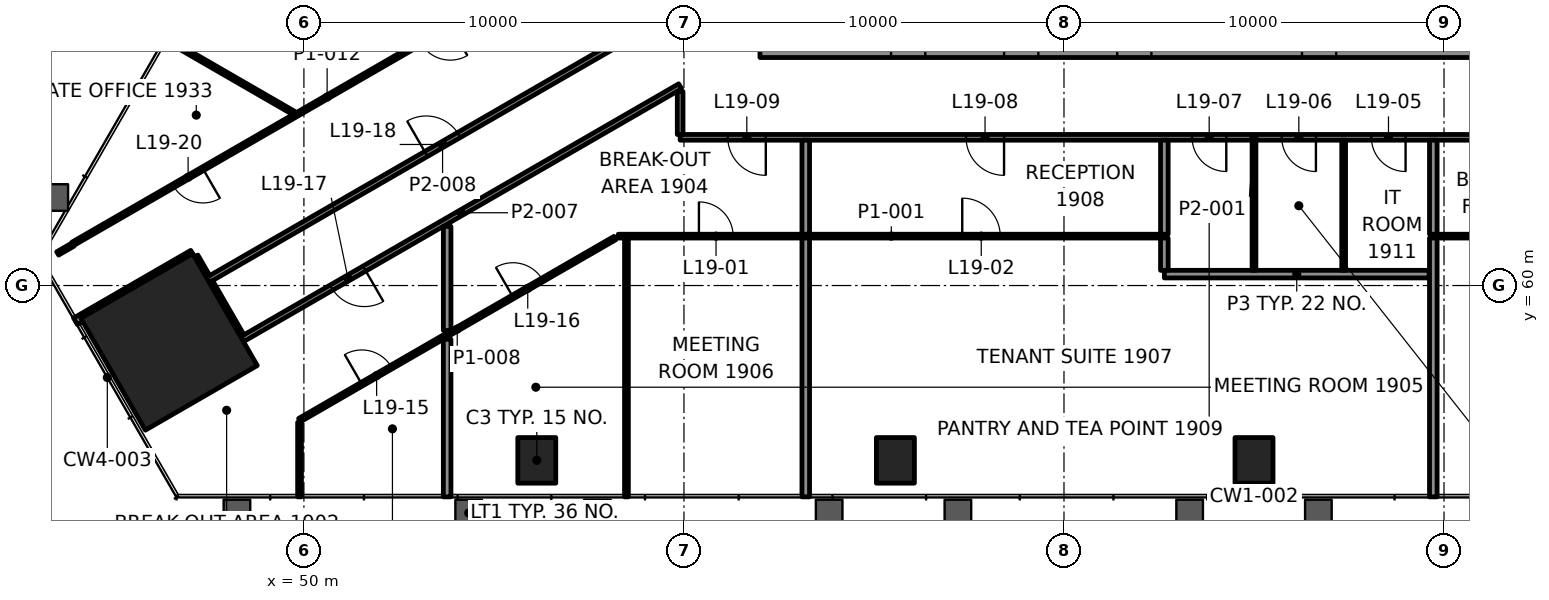
"""IFC4 building model, lengths in metres.
Left out: names, types, materials, properties, quantities, classifications, styles, units other than length and angle.
Written with IfcOpenShell. Run it as: python <this file> out.ifc"""

import sys

from ifc_helpers import new_model, si_unit, direction, frame, frame_2d, origin, origin_2d, place, context, subcontext, project, spatial, rectangle, extrude, element, fill, save


model = new_model("IFC4")
c1 = context("Model", 3, precision=1e-05, world=origin(), true_north=direction((0.0, 1.0)))
c2 = subcontext(c1, "Body", "Model", "MODEL_VIEW")
j1 = project(units=[si_unit("LENGTHUNIT", "METRE"), si_unit("PLANEANGLEUNIT", "RADIAN")], contexts=[c1])
p1 = place(None, origin())
s1 = spatial("IfcSite", under=j1, at=p1, CompositionType="ELEMENT")
p2 = place(p1, origin())
s2 = spatial("IfcBuilding", under=s1, at=p2, CompositionType="ELEMENT")
p3 = place(p2, frame((0.0, 0.0, 86.2)))
s3 = spatial("IfcBuildingStorey", under=s2, at=p3, CompositionType="ELEMENT", Elevation=86.2)
p4 = place(p3, frame((46.45, 58.517, 0.0), z_axis=(0.0, 0.0, 1.0), x_axis=(0.5, -0.866025403784, 0.0)))
e1 = element("IfcColumn", 1, at=p4, inside=s3, PredefinedType="COLUMN", context=c2, shape_type="SweptSolid", body=[
    extrude(rectangle(XDim=3.4, YDim=3.4, at=origin_2d()), origin(), (0.0, 0.0, 1.0), 4.2),
])
for number, where, z_axis, x_axis in (
    (2, (56.128, 55.399, -0.0), (0.0, 0.0, 1.0), (1.0, 0.0, 0.0)),
    (3, (65.564, 55.399, -0.0), (0.0, 0.0, 1.0), (1.0, 0.0, 0.0)),
    (4, (75.0, 55.399, -0.0), (0.0, 0.0, 1.0), (1.0, 0.0, 0.0)),
):
    element("IfcColumn", number, at=place(p3, frame(where, z_axis=z_axis, x_axis=x_axis)), inside=s3, PredefinedType="COLUMN", context=c2, shape_type="SweptSolid", body=[
        extrude(rectangle(XDim=1.0, YDim=1.2, at=origin_2d()), origin(), (0.0, 0.0, 1.0), 4.2),
    ])
p5 = place(p3, frame((62.0, 66.45, 0.0), z_axis=(0.0, 0.0, 1.0), x_axis=(1.0, 0.0, 0.0)))
e5 = element("IfcWall", 5, at=p5, inside=s3, PredefinedType="SHEAR", context=c2, shape_type="SweptSolid", body=[
    extrude(rectangle(XDim=26.0, YDim=0.9, at=frame_2d((13.0, 0.0))), origin(), (0.0, 0.0, 1.0), 4.0),
])
p6 = place(p5, frame((3.45, 0.0, 0.0)))
e6 = element("IfcOpeningElement", 6, at=p6, cuts=e5, PredefinedType="OPENING", context=c2, shape_type="SweptSolid", body=[
    extrude(rectangle(XDim=0.9, YDim=2.1, at=frame_2d((0.45, 1.05))), frame((0.0, 0.46, 0.0), z_axis=(0.0, -1.0, 0.0), x_axis=(1.0, 0.0, 0.0)), (0.0, 0.0, 1.0), 0.92),
])
p7 = place(p5, frame((6.425, 0.0, 0.0)))
e7 = element("IfcOpeningElement", 7, at=p7, cuts=e5, PredefinedType="OPENING", context=c2, shape_type="SweptSolid", body=[
    extrude(rectangle(XDim=0.9, YDim=2.1, at=frame_2d((0.45, 1.05))), frame((0.0, 0.46, 0.0), z_axis=(0.0, -1.0, 0.0), x_axis=(1.0, 0.0, 0.0)), (0.0, 0.0, 1.0), 0.92),
])
p8 = place(p5, frame((9.4, 0.0, 0.0)))
e8 = element("IfcOpeningElement", 8, at=p8, cuts=e5, PredefinedType="OPENING", context=c2, shape_type="SweptSolid", body=[
    extrude(rectangle(XDim=0.9, YDim=2.1, at=frame_2d((0.45, 1.05))), frame((0.0, 0.46, 0.0), z_axis=(0.0, -1.0, 0.0), x_axis=(1.0, 0.0, 0.0)), (0.0, 0.0, 1.0), 0.92),
])
p9 = place(p5, frame((14.262, 0.0, 0.0)))
e9 = element("IfcOpeningElement", 9, at=p9, cuts=e5, PredefinedType="OPENING", context=c2, shape_type="SweptSolid", body=[
    extrude(rectangle(XDim=0.9, YDim=2.1, at=frame_2d((0.45, 1.05))), frame((0.0, 0.46, 0.0), z_axis=(0.0, -1.0, 0.0), x_axis=(1.0, 0.0, 0.0)), (0.0, 0.0, 1.0), 0.92),
])
p10 = place(p5, frame((21.188, 0.0, 0.0)))
e10 = element("IfcOpeningElement", 10, at=p10, cuts=e5, PredefinedType="OPENING", context=c2, shape_type="SweptSolid", body=[
    extrude(rectangle(XDim=0.9, YDim=2.1, at=frame_2d((0.45, 1.05))), frame((0.0, 0.46, 0.0), z_axis=(0.0, -1.0, 0.0), x_axis=(1.0, 0.0, 0.0)), (0.0, 0.0, 1.0), 0.92),
])
p11 = place(p3, frame((72.641, 60.3, 0.0), z_axis=(0.0, 0.0, 1.0), x_axis=(1.0, 0.0, 0.0)))
e11 = element("IfcWall", 11, at=p11, inside=s3, PredefinedType="PARTITIONING", context=c2, shape_type="SweptSolid", body=[
    extrude(rectangle(XDim=6.967, YDim=0.2, at=frame_2d((3.484, 0.0))), origin(), (0.0, 0.0, 1.0), 3.4),
])
p12 = place(p3, frame((58.271, 61.3, 0.0), z_axis=(0.0, 0.0, 1.0), x_axis=(1.0, 0.0, 0.0)))
e12 = element("IfcWall", 12, at=p12, inside=s3, PredefinedType="PARTITIONING", context=c2, shape_type="SweptSolid", body=[
    extrude(rectangle(XDim=14.37, YDim=0.1, at=frame_2d((7.185, 0.0))), origin(), (0.0, 0.0, 1.0), 3.4),
])
p13 = place(p12, frame((2.123, 0.0, 0.0)))
e13 = element("IfcOpeningElement", 13, at=p13, cuts=e12, PredefinedType="OPENING", context=c2, shape_type="SweptSolid", body=[
    extrude(rectangle(XDim=0.9, YDim=2.1, at=frame_2d((0.45, 1.05))), frame((0.0, 0.06, 0.0), z_axis=(0.0, -1.0, 0.0), x_axis=(1.0, 0.0, 0.0)), (0.0, 0.0, 1.0), 0.12),
])
p14 = place(p12, frame((9.052, 0.0, 0.0)))
e14 = element("IfcOpeningElement", 14, at=p14, cuts=e12, PredefinedType="OPENING", context=c2, shape_type="SweptSolid", body=[
    extrude(rectangle(XDim=1.0, YDim=2.1, at=frame_2d((0.5, 1.05))), frame((0.0, 0.06, 0.0), z_axis=(0.0, -1.0, 0.0), x_axis=(1.0, 0.0, 0.0)), (0.0, 0.0, 1.0), 0.12),
])
p15 = place(p3, frame((79.718, 61.3, 0.0), z_axis=(0.0, 0.0, 1.0), x_axis=(1.0, 0.0, 0.0)))
e15 = element("IfcWall", 15, at=p15, inside=s3, PredefinedType="PARTITIONING", context=c2, shape_type="SweptSolid", body=[
    extrude(rectangle(XDim=11.911, YDim=0.1, at=frame_2d((5.956, 0.0))), origin(), (0.0, 0.0, 1.0), 3.4),
])
p16 = place(p15, frame((5.355, 0.0, 0.0)))
e16 = element("IfcOpeningElement", 16, at=p16, cuts=e15, PredefinedType="OPENING", context=c2, shape_type="SweptSolid", body=[
    extrude(rectangle(XDim=1.2, YDim=2.1, at=frame_2d((0.6, 1.05))), frame((0.0, 0.06, 0.0), z_axis=(0.0, -1.0, 0.0), x_axis=(1.0, 0.0, 0.0)), (0.0, 0.0, 1.0), 0.12),
])
p17 = place(p3, frame((90.1, 63.9, 0.0), z_axis=(0.0, 0.0, 1.0), x_axis=(-1.0, 0.0, 0.0)))
e17 = element("IfcWall", 17, at=p17, inside=s3, PredefinedType="PARTITIONING", context=c2, shape_type="SweptSolid", body=[
    extrude(rectangle(XDim=30.2, YDim=0.15, at=frame_2d((15.1, 0.0))), origin(), (0.0, 0.0, 1.0), 3.4),
])
p18 = place(p17, frame((4.792, 0.0, 0.0)))
e18 = element("IfcOpeningElement", 18, at=p18, cuts=e17, PredefinedType="OPENING", context=c2, shape_type="SweptSolid", body=[
    extrude(rectangle(XDim=1.0, YDim=2.1, at=frame_2d((0.5, 1.05))), frame((0.0, 0.085, 0.0), z_axis=(0.0, -1.0, 0.0), x_axis=(1.0, 0.0, 0.0)), (0.0, 0.0, 1.0), 0.17),
])
p19 = place(p17, frame((11.111, 0.0, 0.0)))
e19 = element("IfcOpeningElement", 19, at=p19, cuts=e17, PredefinedType="OPENING", context=c2, shape_type="SweptSolid", body=[
    extrude(rectangle(XDim=0.9, YDim=2.1, at=frame_2d((0.45, 1.05))), frame((0.0, 0.085, 0.0), z_axis=(0.0, -1.0, 0.0), x_axis=(1.0, 0.0, 0.0)), (0.0, 0.0, 1.0), 0.17),
])
p20 = place(p17, frame((13.47, 0.0, 0.0)))
e20 = element("IfcOpeningElement", 20, at=p20, cuts=e17, PredefinedType="OPENING", context=c2, shape_type="SweptSolid", body=[
    extrude(rectangle(XDim=0.9, YDim=2.1, at=frame_2d((0.45, 1.05))), frame((0.0, 0.085, 0.0), z_axis=(0.0, -1.0, 0.0), x_axis=(1.0, 0.0, 0.0)), (0.0, 0.0, 1.0), 0.17),
])
p21 = place(p17, frame((15.83, 0.0, 0.0)))
e21 = element("IfcOpeningElement", 21, at=p21, cuts=e17, PredefinedType="OPENING", context=c2, shape_type="SweptSolid", body=[
    extrude(rectangle(XDim=0.9, YDim=2.1, at=frame_2d((0.45, 1.05))), frame((0.0, 0.085, 0.0), z_axis=(0.0, -1.0, 0.0), x_axis=(1.0, 0.0, 0.0)), (0.0, 0.0, 1.0), 0.17),
])
p22 = place(p17, frame((21.677, 0.0, 0.0)))
e22 = element("IfcOpeningElement", 22, at=p22, cuts=e17, PredefinedType="OPENING", context=c2, shape_type="SweptSolid", body=[
    extrude(rectangle(XDim=1.0, YDim=2.1, at=frame_2d((0.5, 1.05))), frame((0.0, 0.085, 0.0), z_axis=(0.0, -1.0, 0.0), x_axis=(1.0, 0.0, 0.0)), (0.0, 0.0, 1.0), 0.17),
])
p23 = place(p17, frame((27.946, 0.0, 0.0)))
e23 = element("IfcOpeningElement", 23, at=p23, cuts=e17, PredefinedType="OPENING", context=c2, shape_type="SweptSolid", body=[
    extrude(rectangle(XDim=1.0, YDim=2.1, at=frame_2d((0.5, 1.05))), frame((0.0, 0.085, 0.0), z_axis=(0.0, -1.0, 0.0), x_axis=(1.0, 0.0, 0.0)), (0.0, 0.0, 1.0), 0.17),
])
p24 = place(p3, frame((49.885, 56.458, 0.0), z_axis=(0.0, 0.0, 1.0), x_axis=(0.866030313286, 0.499991496398, 0.0)))
e24 = element("IfcWall", 24, at=p24, inside=s3, PredefinedType="PARTITIONING", context=c2, shape_type="SweptSolid", body=[
    extrude(rectangle(XDim=9.583, YDim=0.1, at=frame_2d((4.792, 0.0))), origin(), (0.0, 0.0, 1.0), 3.4),
])
p25 = place(p24, frame((1.892, 0.0, 0.0)))
e25 = element("IfcOpeningElement", 25, at=p25, cuts=e24, PredefinedType="OPENING", context=c2, shape_type="SweptSolid", body=[
    extrude(rectangle(XDim=0.9, YDim=2.1, at=frame_2d((0.45, 1.05))), frame((0.0, 0.06, 0.0), z_axis=(0.0, -1.0, 0.0), x_axis=(1.0, 0.0, 0.0)), (0.0, 0.0, 1.0), 0.12),
])
p26 = place(p24, frame((6.484, 0.0, 0.0)))
e26 = element("IfcOpeningElement", 26, at=p26, cuts=e24, PredefinedType="OPENING", context=c2, shape_type="SweptSolid", body=[
    extrude(rectangle(XDim=0.9, YDim=2.1, at=frame_2d((0.45, 1.05))), frame((0.0, 0.06, 0.0), z_axis=(0.0, -1.0, 0.0), x_axis=(1.0, 0.0, 0.0)), (0.0, 0.0, 1.0), 0.12),
])
p27 = place(p3, frame((59.9, 65.243, 0.0), z_axis=(0.0, 0.0, 1.0), x_axis=(-0.866025527764, -0.499999785261, 0.0)))
e27 = element("IfcWall", 27, at=p27, inside=s3, PredefinedType="PARTITIONING", context=c2, shape_type="SweptSolid", body=[
    extrude(rectangle(XDim=13.31, YDim=0.15, at=frame_2d((6.655, 0.0))), origin(), (0.0, 0.0, 1.0), 3.247),
])
p28 = place(p27, frame((9.594, 0.0, 0.0)))
e28 = element("IfcOpeningElement", 28, at=p28, cuts=e27, PredefinedType="OPENING", context=c2, shape_type="SweptSolid", body=[
    extrude(rectangle(XDim=1.0, YDim=2.1, at=frame_2d((0.5, 1.05))), frame((0.0, 0.085, 0.0), z_axis=(0.0, -1.0, 0.0), x_axis=(1.0, 0.0, 0.0)), (0.0, 0.0, 1.0), 0.17),
])
p29 = place(p3, frame((47.473, 60.146, 0.0), z_axis=(0.0, 0.0, 1.0), x_axis=(0.866025677055, 0.499999526681, 0.0)))
e29 = element("IfcWall", 29, at=p29, inside=s3, PredefinedType="PARTITIONING", context=c2, shape_type="SweptSolid", body=[
    extrude(rectangle(XDim=14.263, YDim=0.15, at=frame_2d((7.132, 0.0))), origin(), (0.0, 0.0, 1.0), 3.4),
])
p30 = place(p29, frame((6.632, 0.0, 0.0)))
e30 = element("IfcOpeningElement", 30, at=p30, cuts=e29, PredefinedType="OPENING", context=c2, shape_type="SweptSolid", body=[
    extrude(rectangle(XDim=1.0, YDim=2.1, at=frame_2d((0.5, 1.05))), frame((0.0, 0.085, 0.0), z_axis=(0.0, -1.0, 0.0), x_axis=(1.0, 0.0, 0.0)), (0.0, 0.0, 1.0), 0.17),
])
p31 = place(p3, frame((43.99, 59.058, 0.0), z_axis=(0.0, 0.0, 1.0), x_axis=(0.866031398331, 0.499989616998, 0.0)))
e31 = element("IfcWall", 31, at=p31, inside=s3, PredefinedType="PARTITIONING", context=c2, shape_type="SweptSolid", body=[
    extrude(rectangle(XDim=3.56, YDim=0.2, at=frame_2d((1.78, 0.0))), origin(), (0.0, 0.0, 1.0), 3.4),
])
p32 = place(p3, frame((43.521, 60.845, 0.0), z_axis=(0.0, 0.0, 1.0), x_axis=(0.865979310119, 0.500079828073, 0.0)))
e32 = element("IfcWall", 32, at=p32, inside=s3, PredefinedType="PARTITIONING", context=c2, shape_type="SweptSolid", body=[
    extrude(rectangle(XDim=0.473, YDim=0.1, at=frame_2d((0.237, 0.0))), origin(), (0.0, 0.0, 1.0), 3.4),
])
p33 = place(p3, frame((57.3, 68.823, 0.0), z_axis=(0.0, 0.0, 1.0), x_axis=(-0.866026891502, -0.499997423189, 0.0)))
e33 = element("IfcWall", 33, at=p33, inside=s3, PredefinedType="PARTITIONING", context=c2, shape_type="SweptSolid", body=[
    extrude(rectangle(XDim=15.448, YDim=0.1, at=frame_2d((7.724, 0.0))), origin(), (0.0, 0.0, 1.0), 3.4),
])
p34 = place(p33, frame((3.982, 0.0, 0.0)))
e34 = element("IfcOpeningElement", 34, at=p34, cuts=e33, PredefinedType="OPENING", context=c2, shape_type="SweptSolid", body=[
    extrude(rectangle(XDim=0.9, YDim=2.1, at=frame_2d((0.45, 1.05))), frame((0.0, 0.06, 0.0), z_axis=(0.0, -1.0, 0.0), x_axis=(1.0, 0.0, 0.0)), (0.0, 0.0, 1.0), 0.12),
])
p35 = place(p33, frame((11.498, 0.0, 0.0)))
e35 = element("IfcOpeningElement", 35, at=p35, cuts=e33, PredefinedType="OPENING", context=c2, shape_type="SweptSolid", body=[
    extrude(rectangle(XDim=0.9, YDim=2.1, at=frame_2d((0.45, 1.05))), frame((0.0, 0.06, 0.0), z_axis=(0.0, -1.0, 0.0), x_axis=(1.0, 0.0, 0.0)), (0.0, 0.0, 1.0), 0.12),
])
p36 = place(p3, frame((79.718, 54.439, 0.0), z_axis=(0.0, 0.0, 1.0), x_axis=(0.0, 1.0, 0.0)))
e36 = element("IfcWall", 36, at=p36, inside=s3, PredefinedType="PARTITIONING", context=c2, shape_type="SweptSolid", body=[
    extrude(rectangle(XDim=6.811, YDim=0.2, at=frame_2d((3.405, 0.0))), origin(), (0.0, 0.0, 1.0), 3.165),
])
for number, where, z_axis, x_axis in (
    (37, (77.359, 60.4, 0.0), (0.0, 0.0, 1.0), (0.0, 1.0, 0.0)),
    (38, (75.0, 60.4, 0.0), (0.0, 0.0, 1.0), (0.0, 1.0, 0.0)),
):
    element("IfcWall", number, at=place(p3, frame(where, z_axis=z_axis, x_axis=x_axis)), inside=s3, PredefinedType="PARTITIONING", context=c2, shape_type="SweptSolid", body=[
        extrude(rectangle(XDim=3.425, YDim=0.1, at=frame_2d((1.712, 0.0))), origin(), (0.0, 0.0, 1.0), 3.4),
    ])
p37 = place(p3, frame((72.641, 60.4, 0.0), z_axis=(0.0, 0.0, 1.0), x_axis=(0.0, 1.0, 0.0)))
e39 = element("IfcWall", 39, at=p37, inside=s3, PredefinedType="PARTITIONING", context=c2, shape_type="SweptSolid", body=[
    extrude(rectangle(XDim=0.85, YDim=0.2, at=frame_2d((0.425, 0.0))), origin(), (0.0, 0.0, 1.0), 3.4),
])
p38 = place(p3, frame((63.205, 54.439, 0.0), z_axis=(0.0, 0.0, 1.0), x_axis=(0.0, 1.0, 0.0)))
e40 = element("IfcWall", 40, at=p38, inside=s3, PredefinedType="PARTITIONING", context=c2, shape_type="SweptSolid", body=[
    extrude(rectangle(XDim=6.811, YDim=0.2, at=frame_2d((3.405, 0.0))), origin(), (0.0, 0.0, 1.0), 3.165),
])
p39 = place(p3, frame((59.9, 63.975, 0.0), z_axis=(0.0, 0.0, 1.0), x_axis=(0.0, 1.0, 0.0)))
e41 = element("IfcWall", 41, at=p39, inside=s3, PredefinedType="PARTITIONING", context=c2, shape_type="SweptSolid", body=[
    extrude(rectangle(XDim=1.131, YDim=0.15, at=frame_2d((0.565, 0.0))), origin(), (0.0, 0.0, 1.0), 3.247),
])
p40 = place(p3, frame((58.487, 54.439, 0.0), z_axis=(0.0, 0.0, 1.0), x_axis=(0.0, 1.0, 0.0)))
e42 = element("IfcWall", 42, at=p40, inside=s3, PredefinedType="PARTITIONING", context=c2, shape_type="SweptSolid", body=[
    extrude(rectangle(XDim=6.811, YDim=0.1, at=frame_2d((3.405, 0.0))), origin(), (0.0, 0.0, 1.0), 3.165),
])
p41 = place(p3, frame((53.769, 54.439, 0.0), z_axis=(0.0, 0.0, 1.0), x_axis=(0.0, 1.0, 0.0)))
e43 = element("IfcWall", 43, at=p41, inside=s3, PredefinedType="PARTITIONING", context=c2, shape_type="SweptSolid", body=[
    extrude(rectangle(XDim=4.146, YDim=0.2, at=frame_2d((2.073, 0.0))), origin(), (0.0, 0.0, 1.0), 3.4),
])
p42 = place(p3, frame((49.885, 54.439, 0.0), z_axis=(0.0, 0.0, 1.0), x_axis=(0.0, 1.0, 0.0)))
e44 = element("IfcWall", 44, at=p42, inside=s3, PredefinedType="PARTITIONING", context=c2, shape_type="SweptSolid", body=[
    extrude(rectangle(XDim=1.961, YDim=0.1, at=frame_2d((0.981, 0.0))), origin(), (0.0, 0.0, 1.0), 3.4),
])
p43 = place(p3, frame((48.335, 58.653, 0.0), z_axis=(0.0, 0.0, 1.0), x_axis=(-0.499991515992, 0.866030301974, 0.0)))
e45 = element("IfcWall", 45, at=p43, inside=s3, PredefinedType="PARTITIONING", context=c2, shape_type="SweptSolid", body=[
    extrude(rectangle(XDim=1.649, YDim=0.2, at=frame_2d((0.825, 0.0))), origin(), (0.0, 0.0, 1.0), 3.247),
])
p44 = place(p3, frame((49.732, 64.541, 0.0), z_axis=(0.0, 0.0, 1.0), x_axis=(-0.866020177134, 0.500009052715, 0.0)))
e46 = element("IfcWall", 46, at=p44, inside=s3, PredefinedType="PARTITIONING", context=c2, shape_type="SweptSolid", body=[
    extrude(rectangle(XDim=3.908, YDim=0.1, at=frame_2d((1.954, 0.0))), origin(), (0.0, 0.0, 1.0), 3.4),
])
for number, where, z_axis, x_axis in (
    (47, (72.641, 61.35, 0.0), (0.0, 0.0, 1.0), (0.0, 1.0, 0.0)),
    (48, (79.718, 61.35, 0.0), (0.0, 0.0, 1.0), (0.0, 1.0, 0.0)),
):
    element("IfcWall", number, at=place(p3, frame(where, z_axis=z_axis, x_axis=x_axis)), inside=s3, PredefinedType="PARTITIONING", context=c2, shape_type="SweptSolid", body=[
        extrude(rectangle(XDim=2.475, YDim=0.2, at=frame_2d((1.237, 0.0))), origin(), (0.0, 0.0, 1.0), 3.4),
    ])
p45 = place(p3, frame((53.769, 58.816, 0.0), z_axis=(0.0, 0.0, 1.0), x_axis=(0.0, 1.0, 0.0)))
e49 = element("IfcWall", 49, at=p45, inside=s3, PredefinedType="PARTITIONING", context=c2, shape_type="SweptSolid", body=[
    extrude(rectangle(XDim=2.74, YDim=0.2, at=frame_2d((1.37, 0.0))), origin(), (0.0, 0.0, 1.0), 3.4),
])
p46 = place(p3, frame((47.435, 60.211, 0.0), z_axis=(0.0, 0.0, 1.0), x_axis=(-0.499801510763, 0.866139971275, 0.0)))
e50 = element("IfcWall", 50, at=p46, inside=s3, PredefinedType="PARTITIONING", context=c2, shape_type="SweptSolid", body=[
    extrude(rectangle(XDim=0.624, YDim=0.2, at=frame_2d((0.312, 0.0))), origin(), (0.0, 0.0, 1.0), 3.4),
])
p47 = place(p3, frame((63.205, 61.35, 0.0), z_axis=(0.0, 0.0, 1.0), x_axis=(0.0, 1.0, 0.0)))
e51 = element("IfcWall", 51, at=p47, inside=s3, PredefinedType="PARTITIONING", context=c2, shape_type="SweptSolid", body=[
    extrude(rectangle(XDim=2.475, YDim=0.2, at=frame_2d((1.237, 0.0))), origin(), (0.0, 0.0, 1.0), 3.4),
])
p48 = place(p13, origin())
e52 = element("IfcDoor", 52, at=p48, inside=s3, OperationType="SINGLE_SWING_LEFT", PredefinedType="DOOR", context=c2, shape_type="SweptSolid", body=[
    extrude(rectangle(XDim=0.9, YDim=2.1, at=frame_2d((0.45, 1.05))), frame((0.0, 0.025, 0.0), z_axis=(0.0, -1.0, 0.0), x_axis=(1.0, 0.0, 0.0)), (0.0, 0.0, 1.0), 0.05),
])
fill(e13, e52)
p49 = place(p14, origin())
e53 = element("IfcDoor", 53, at=p49, inside=s3, OperationType="SINGLE_SWING_RIGHT", PredefinedType="DOOR", context=c2, shape_type="SweptSolid", body=[
    extrude(rectangle(XDim=1.0, YDim=2.1, at=frame_2d((0.5, 1.05))), frame((0.0, 0.025, 0.0), z_axis=(0.0, -1.0, 0.0), x_axis=(1.0, 0.0, 0.0)), (0.0, 0.0, 1.0), 0.05),
])
fill(e14, e53)
p50 = place(p19, origin())
e54 = element("IfcDoor", 54, at=p50, inside=s3, OperationType="SINGLE_SWING_LEFT", PredefinedType="DOOR", context=c2, shape_type="SweptSolid", body=[
    extrude(rectangle(XDim=0.9, YDim=2.1, at=frame_2d((0.45, 1.05))), frame((0.0, 0.025, 0.0), z_axis=(0.0, -1.0, 0.0), x_axis=(1.0, 0.0, 0.0)), (0.0, 0.0, 1.0), 0.05),
])
fill(e19, e54)
p51 = place(p20, origin())
e55 = element("IfcDoor", 55, at=p51, inside=s3, OperationType="SINGLE_SWING_RIGHT", PredefinedType="DOOR", context=c2, shape_type="SweptSolid", body=[
    extrude(rectangle(XDim=0.9, YDim=2.1, at=frame_2d((0.45, 1.05))), frame((0.0, 0.025, 0.0), z_axis=(0.0, -1.0, 0.0), x_axis=(1.0, 0.0, 0.0)), (0.0, 0.0, 1.0), 0.05),
])
fill(e20, e55)
p52 = place(p21, origin())
e56 = element("IfcDoor", 56, at=p52, inside=s3, OperationType="SINGLE_SWING_LEFT", PredefinedType="DOOR", context=c2, shape_type="SweptSolid", body=[
    extrude(rectangle(XDim=0.9, YDim=2.1, at=frame_2d((0.45, 1.05))), frame((0.0, 0.025, 0.0), z_axis=(0.0, -1.0, 0.0), x_axis=(1.0, 0.0, 0.0)), (0.0, 0.0, 1.0), 0.05),
])
fill(e21, e56)
p53 = place(p22, origin())
e57 = element("IfcDoor", 57, at=p53, inside=s3, OperationType="SINGLE_SWING_RIGHT", PredefinedType="DOOR", context=c2, shape_type="SweptSolid", body=[
    extrude(rectangle(XDim=1.0, YDim=2.1, at=frame_2d((0.5, 1.05))), frame((0.0, 0.025, 0.0), z_axis=(0.0, -1.0, 0.0), x_axis=(1.0, 0.0, 0.0)), (0.0, 0.0, 1.0), 0.05),
])
fill(e22, e57)
p54 = place(p23, origin())
e58 = element("IfcDoor", 58, at=p54, inside=s3, OperationType="SINGLE_SWING_RIGHT", PredefinedType="DOOR", context=c2, shape_type="SweptSolid", body=[
    extrude(rectangle(XDim=1.0, YDim=2.1, at=frame_2d((0.5, 1.05))), frame((0.0, 0.025, 0.0), z_axis=(0.0, -1.0, 0.0), x_axis=(1.0, 0.0, 0.0)), (0.0, 0.0, 1.0), 0.05),
])
fill(e23, e58)
p55 = place(p25, origin())
e59 = element("IfcDoor", 59, at=p55, inside=s3, OperationType="SINGLE_SWING_RIGHT", PredefinedType="DOOR", context=c2, shape_type="SweptSolid", body=[
    extrude(rectangle(XDim=0.9, YDim=2.1, at=frame_2d((0.45, 1.05))), frame((0.0, 0.025, 0.0), z_axis=(0.0, -1.0, 0.0), x_axis=(1.0, 0.0, 0.0)), (0.0, 0.0, 1.0), 0.05),
])
fill(e25, e59)
p56 = place(p26, origin())
e60 = element("IfcDoor", 60, at=p56, inside=s3, OperationType="SINGLE_SWING_RIGHT", PredefinedType="DOOR", context=c2, shape_type="SweptSolid", body=[
    extrude(rectangle(XDim=0.9, YDim=2.1, at=frame_2d((0.45, 1.05))), frame((0.0, 0.025, 0.0), z_axis=(0.0, -1.0, 0.0), x_axis=(1.0, 0.0, 0.0)), (0.0, 0.0, 1.0), 0.05),
])
fill(e26, e60)
p57 = place(p28, origin())
e61 = element("IfcDoor", 61, at=p57, inside=s3, OperationType="SINGLE_SWING_RIGHT", PredefinedType="DOOR", context=c2, shape_type="SweptSolid", body=[
    extrude(rectangle(XDim=1.0, YDim=2.1, at=frame_2d((0.5, 1.05))), frame((0.0, 0.025, 0.0), z_axis=(0.0, -1.0, 0.0), x_axis=(1.0, 0.0, 0.0)), (0.0, 0.0, 1.0), 0.05),
])
fill(e28, e61)
p58 = place(p30, origin())
e62 = element("IfcDoor", 62, at=p58, inside=s3, OperationType="SINGLE_SWING_LEFT", PredefinedType="DOOR", context=c2, shape_type="SweptSolid", body=[
    extrude(rectangle(XDim=1.0, YDim=2.1, at=frame_2d((0.5, 1.05))), frame((0.0, 0.025, 0.0), z_axis=(0.0, -1.0, 0.0), x_axis=(1.0, 0.0, 0.0)), (0.0, 0.0, 1.0), 0.05),
])
fill(e30, e62)
p59 = place(p35, origin())
e63 = element("IfcDoor", 63, at=p59, inside=s3, OperationType="SINGLE_SWING_LEFT", PredefinedType="DOOR", context=c2, shape_type="SweptSolid", body=[
    extrude(rectangle(XDim=0.9, YDim=2.1, at=frame_2d((0.45, 1.05))), frame((0.0, 0.025, 0.0), z_axis=(0.0, -1.0, 0.0), x_axis=(1.0, 0.0, 0.0)), (0.0, 0.0, 1.0), 0.05),
])
fill(e35, e63)
save(model, sys.argv[1])
